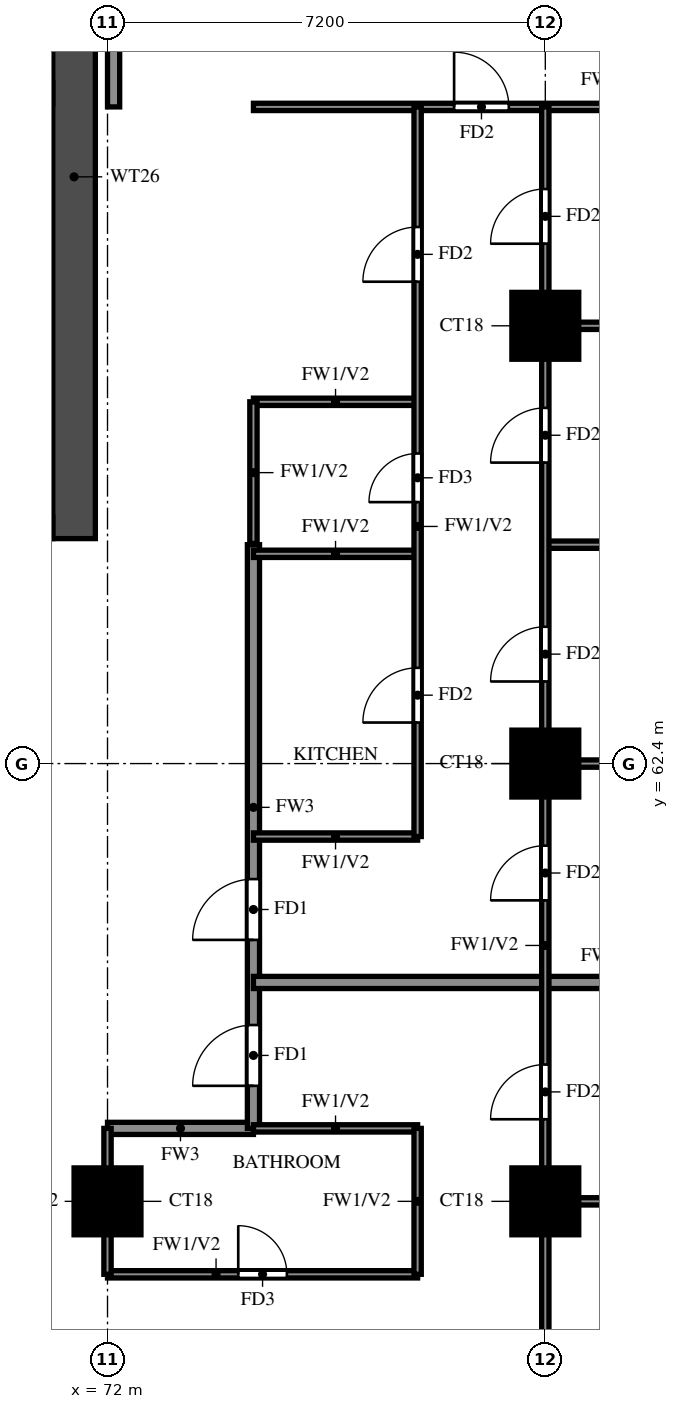
"""IFC4 building model, lengths in metres.
Left out: names, types, materials, properties, quantities, classifications, styles, units other than length and angle.
Written with IfcOpenShell. Run it as: python <this file> out.ifc"""

import sys

from ifc_helpers import new_model, si_unit, direction, frame, frame_2d, origin, origin_2d, place, context, subcontext, project, spatial, rectangle, extrude, source, transform, mapped, element, fill, save


model = new_model("IFC4")
c1 = context("Model", 3, precision=1e-05, world=origin(), true_north=direction((0.0, 1.0)))
c2 = subcontext(c1, "Body", "Model", "MODEL_VIEW")
j1 = project(units=[si_unit("LENGTHUNIT", "METRE"), si_unit("PLANEANGLEUNIT", "RADIAN")], contexts=[c1])
p1 = place(None, origin())
s1 = spatial("IfcSite", under=j1, at=p1, CompositionType="ELEMENT")
p2 = place(p1, origin())
s2 = spatial("IfcBuilding", under=s1, at=p2, CompositionType="ELEMENT")
p3 = place(p2, frame((0.0, 0.0, 123.5)))
s3 = spatial("IfcBuildingStorey", under=s2, at=p3, CompositionType="ELEMENT", Elevation=123.5)
m1 = source(origin(), c2, "Body", "SweptSolid", [
    extrude(rectangle(XDim=1.1, YDim=1.1, at=origin_2d()), origin(), (0.0, 0.0, 1.0), 3.2),
])
for number, where, z_axis, x_axis in (
    (1, (72.0, 55.2, 0.0), (0.0, 0.0, 1.0), (1.0, 0.0, 0.0)),
    (2, (79.2, 55.2, 0.0), (0.0, 0.0, 1.0), (1.0, 0.0, 0.0)),
    (3, (79.2, 62.4, 0.0), (0.0, 0.0, 1.0), (1.0, 0.0, 0.0)),
    (4, (79.2, 69.6, 0.0), (0.0, 0.0, 1.0), (1.0, 0.0, 0.0)),
):
    element("IfcColumn", number, at=place(p3, frame(where, z_axis=z_axis, x_axis=x_axis)), inside=s3, PredefinedType="COLUMN", context=c2, shape_type="MappedRepresentation", body=[
        mapped(m1, transform((0.0, 0.0, 0.0))),
    ])
p4 = place(p3, frame((71.45, 66.1, 0.0), z_axis=(0.0, 0.0, 1.0), x_axis=(0.0, 1.0, 0.0)))
e5 = element("IfcWall", 5, at=p4, inside=s3, PredefinedType="SHEAR", context=c2, shape_type="SweptSolid", body=[
    extrude(rectangle(XDim=11.9, YDim=0.7, at=frame_2d((5.95, 0.0))), origin(), (0.0, 0.0, 1.0), 3.2),
])
p5 = place(p3, frame((29.7, 66.275, 0.0), z_axis=(0.0, 0.0, 1.0), x_axis=(1.0, 0.0, 0.0)))
e6 = element("IfcWall", 6, at=p5, inside=s3, PredefinedType="SHEAR", context=c2, shape_type="SweptSolid", body=[
    extrude(rectangle(XDim=41.4, YDim=0.35, at=frame_2d((20.7, 0.0))), origin(), (0.0, 0.0, 1.0), 3.2),
])
p6 = place(p5, frame((0.925, 0.0, 0.0)))
e7 = element("IfcOpeningElement", 7, at=p6, cuts=e6, PredefinedType="OPENING", context=c2, shape_type="SweptSolid", body=[
    extrude(rectangle(XDim=1.1, YDim=2.1, at=frame_2d((0.55, 1.05))), frame((0.0, 0.185, 0.0), z_axis=(0.0, -1.0, 0.0), x_axis=(1.0, 0.0, 0.0)), (0.0, 0.0, 1.0), 0.37),
])
p7 = place(p5, frame((3.712, 0.0, 0.0)))
e8 = element("IfcOpeningElement", 8, at=p7, cuts=e6, PredefinedType="OPENING", context=c2, shape_type="SweptSolid", body=[
    extrude(rectangle(XDim=1.8, YDim=2.1, at=frame_2d((0.9, 1.05))), frame((0.0, 0.185, 0.0), z_axis=(0.0, -1.0, 0.0), x_axis=(1.0, 0.0, 0.0)), (0.0, 0.0, 1.0), 0.37),
])
p8 = place(p3, frame((72.0, 56.4, 0.0), z_axis=(0.0, 0.0, 1.0), x_axis=(1.0, 0.0, 0.0)))
e9 = element("IfcWall", 9, at=p8, inside=s3, PredefinedType="SOLIDWALL", context=c2, shape_type="SweptSolid", body=[
    extrude(rectangle(XDim=2.4, YDim=0.2, at=frame_2d((1.2, 0.0))), origin(), (0.0, 0.0, 1.0), 3.2),
])
p9 = place(p3, frame((72.1, 73.2, 0.0), z_axis=(0.0, 0.0, 1.0), x_axis=(0.0, 1.0, 0.0)))
e10 = element("IfcWall", 10, at=p9, inside=s3, PredefinedType="SOLIDWALL", context=c2, shape_type="SweptSolid", body=[
    extrude(rectangle(XDim=4.8, YDim=0.2, at=frame_2d((2.4, 0.0))), origin(), (0.0, 0.0, 1.0), 3.2),
])
p10 = place(p3, frame((74.4, 56.4, 0.0), z_axis=(0.0, 0.0, 1.0), x_axis=(0.0, 1.0, 0.0)))
e11 = element("IfcWall", 11, at=p10, inside=s3, PredefinedType="SOLIDWALL", context=c2, shape_type="SweptSolid", body=[
    extrude(rectangle(XDim=9.6, YDim=0.2, at=frame_2d((4.8, 0.0))), origin(), (0.0, 0.0, 1.0), 3.2),
])
p11 = place(p10, frame((0.7, 0.0, 0.0)))
e12 = element("IfcOpeningElement", 12, at=p11, cuts=e11, PredefinedType="OPENING", context=c2, shape_type="SweptSolid", body=[
    extrude(rectangle(XDim=1.0, YDim=2.1, at=frame_2d((0.5, 1.05))), frame((0.0, 0.11, 0.0), z_axis=(0.0, -1.0, 0.0), x_axis=(1.0, 0.0, 0.0)), (0.0, 0.0, 1.0), 0.22),
])
p12 = place(p10, frame((3.1, 0.0, 0.0)))
e13 = element("IfcOpeningElement", 13, at=p12, cuts=e11, PredefinedType="OPENING", context=c2, shape_type="SweptSolid", body=[
    extrude(rectangle(XDim=1.0, YDim=2.1, at=frame_2d((0.5, 1.05))), frame((0.0, 0.11, 0.0), z_axis=(0.0, -1.0, 0.0), x_axis=(1.0, 0.0, 0.0)), (0.0, 0.0, 1.0), 0.22),
])
p13 = place(p3, frame((74.4, 58.8, 0.0), z_axis=(0.0, 0.0, 1.0), x_axis=(1.0, 0.0, 0.0)))
e14 = element("IfcWall", 14, at=p13, inside=s3, PredefinedType="SOLIDWALL", context=c2, shape_type="SweptSolid", body=[
    extrude(rectangle(XDim=11.875, YDim=0.2, at=frame_2d((5.938, 0.0))), origin(), (0.0, 0.0, 1.0), 2.3),
])
p14 = place(p3, frame((72.0, 54.0, 0.0), z_axis=(0.0, 0.0, 1.0), x_axis=(1.0, 0.0, 0.0)))
e15 = element("IfcWall", 15, at=p14, inside=s3, PredefinedType="PARTITIONING", context=c2, shape_type="SweptSolid", body=[
    extrude(rectangle(XDim=5.1, YDim=0.12, at=frame_2d((2.55, 0.0))), origin(), (0.0, 0.0, 1.0), 3.2),
])
p15 = place(p14, frame((2.15, 0.0, 0.0)))
e16 = element("IfcOpeningElement", 16, at=p15, cuts=e15, PredefinedType="OPENING", context=c2, shape_type="SweptSolid", body=[
    extrude(rectangle(XDim=0.8, YDim=2.1, at=frame_2d((0.4, 1.05))), frame((0.0, 0.07, 0.0), z_axis=(0.0, -1.0, 0.0), x_axis=(1.0, 0.0, 0.0)), (0.0, 0.0, 1.0), 0.14),
])
p16 = place(p3, frame((79.2, 55.2, 0.0), z_axis=(0.0, 0.0, 1.0), x_axis=(1.0, 0.0, 0.0)))
e17 = element("IfcWall", 17, at=p16, inside=s3, PredefinedType="PARTITIONING", context=c2, shape_type="SweptSolid", body=[
    extrude(rectangle(XDim=7.075, YDim=0.12, at=frame_2d((3.538, 0.0))), origin(), (0.0, 0.0, 1.0), 3.2),
])
for number, where, z_axis, x_axis in (
    (18, (74.4, 56.4, 0.0), (0.0, 0.0, 1.0), (1.0, 0.0, 0.0)),
    (19, (74.4, 61.2, 0.0), (0.0, 0.0, 1.0), (1.0, 0.0, 0.0)),
):
    element("IfcWall", number, at=place(p3, frame(where, z_axis=z_axis, x_axis=x_axis)), inside=s3, PredefinedType="PARTITIONING", context=c2, shape_type="SweptSolid", body=[
        extrude(rectangle(XDim=2.7, YDim=0.12, at=frame_2d((1.35, 0.0))), origin(), (0.0, 0.0, 1.0), 3.2),
    ])
p17 = place(p3, frame((79.2, 62.4, 0.0), z_axis=(0.0, 0.0, 1.0), x_axis=(1.0, 0.0, 0.0)))
e20 = element("IfcWall", 20, at=p17, inside=s3, PredefinedType="PARTITIONING", context=c2, shape_type="SweptSolid", body=[
    extrude(rectangle(XDim=7.075, YDim=0.12, at=frame_2d((3.538, 0.0))), origin(), (0.0, 0.0, 1.0), 3.2),
])
p18 = place(p3, frame((74.4, 65.85, 0.0), z_axis=(0.0, 0.0, 1.0), x_axis=(1.0, 0.0, 0.0)))
e21 = element("IfcWall", 21, at=p18, inside=s3, PredefinedType="PARTITIONING", context=c2, shape_type="SweptSolid", body=[
    extrude(rectangle(XDim=2.7, YDim=0.12, at=frame_2d((1.35, 0.0))), origin(), (0.0, 0.0, 1.0), 3.2),
])
p19 = place(p3, frame((79.2, 66.0, 0.0), z_axis=(0.0, 0.0, 1.0), x_axis=(1.0, 0.0, 0.0)))
e22 = element("IfcWall", 22, at=p19, inside=s3, PredefinedType="PARTITIONING", context=c2, shape_type="SweptSolid", body=[
    extrude(rectangle(XDim=7.075, YDim=0.12, at=frame_2d((3.538, 0.0))), origin(), (0.0, 0.0, 1.0), 2.3),
])
p20 = place(p3, frame((74.4, 68.35, 0.0), z_axis=(0.0, 0.0, 1.0), x_axis=(1.0, 0.0, 0.0)))
e23 = element("IfcWall", 23, at=p20, inside=s3, PredefinedType="PARTITIONING", context=c2, shape_type="SweptSolid", body=[
    extrude(rectangle(XDim=2.7, YDim=0.12, at=frame_2d((1.35, 0.0))), origin(), (0.0, 0.0, 1.0), 3.2),
])
p21 = place(p3, frame((79.2, 69.6, 0.0), z_axis=(0.0, 0.0, 1.0), x_axis=(1.0, 0.0, 0.0)))
e24 = element("IfcWall", 24, at=p21, inside=s3, PredefinedType="PARTITIONING", context=c2, shape_type="SweptSolid", body=[
    extrude(rectangle(XDim=7.075, YDim=0.12, at=frame_2d((3.538, 0.0))), origin(), (0.0, 0.0, 1.0), 3.2),
])
p22 = place(p3, frame((74.4, 73.2, 0.0), z_axis=(0.0, 0.0, 1.0), x_axis=(1.0, 0.0, 0.0)))
e25 = element("IfcWall", 25, at=p22, inside=s3, PredefinedType="PARTITIONING", context=c2, shape_type="SweptSolid", body=[
    extrude(rectangle(XDim=11.875, YDim=0.12, at=frame_2d((5.938, 0.0))), origin(), (0.0, 0.0, 1.0), 2.3),
])
p23 = place(p22, frame((3.3, 0.0, 0.0)))
e26 = element("IfcOpeningElement", 26, at=p23, cuts=e25, PredefinedType="OPENING", context=c2, shape_type="SweptSolid", body=[
    extrude(rectangle(XDim=0.9, YDim=2.1, at=frame_2d((0.45, 1.05))), frame((0.0, 0.07, 0.0), z_axis=(0.0, -1.0, 0.0), x_axis=(1.0, 0.0, 0.0)), (0.0, 0.0, 1.0), 0.14),
])
p24 = place(p3, frame((72.0, 54.0, 0.0), z_axis=(0.0, 0.0, 1.0), x_axis=(0.0, 1.0, 0.0)))
e27 = element("IfcWall", 27, at=p24, inside=s3, PredefinedType="PARTITIONING", context=c2, shape_type="SweptSolid", body=[
    extrude(rectangle(XDim=2.4, YDim=0.12, at=frame_2d((1.2, 0.0))), origin(), (0.0, 0.0, 1.0), 3.2),
])
p25 = place(p3, frame((74.4, 66.02, 0.0), z_axis=(0.0, 0.0, 1.0), x_axis=(0.0, 1.0, 0.0)))
e28 = element("IfcWall", 28, at=p25, inside=s3, PredefinedType="PARTITIONING", context=c2, shape_type="SweptSolid", body=[
    extrude(rectangle(XDim=2.33, YDim=0.12, at=frame_2d((1.165, 0.0))), origin(), (0.0, 0.0, 1.0), 3.2),
])
p26 = place(p3, frame((77.1, 54.0, 0.0), z_axis=(0.0, 0.0, 1.0), x_axis=(0.0, 1.0, 0.0)))
e29 = element("IfcWall", 29, at=p26, inside=s3, PredefinedType="PARTITIONING", context=c2, shape_type="SweptSolid", body=[
    extrude(rectangle(XDim=2.4, YDim=0.12, at=frame_2d((1.2, 0.0))), origin(), (0.0, 0.0, 1.0), 3.2),
])
p27 = place(p3, frame((77.1, 61.2, 0.0), z_axis=(0.0, 0.0, 1.0), x_axis=(0.0, 1.0, 0.0)))
e30 = element("IfcWall", 30, at=p27, inside=s3, PredefinedType="PARTITIONING", context=c2, shape_type="SweptSolid", body=[
    extrude(rectangle(XDim=12.0, YDim=0.12, at=frame_2d((6.0, 0.0))), origin(), (0.0, 0.0, 1.0), 3.2),
])
p28 = place(p27, frame((1.875, 0.0, 0.0)))
e31 = element("IfcOpeningElement", 31, at=p28, cuts=e30, PredefinedType="OPENING", context=c2, shape_type="SweptSolid", body=[
    extrude(rectangle(XDim=0.9, YDim=2.1, at=frame_2d((0.45, 1.05))), frame((0.0, 0.07, 0.0), z_axis=(0.0, -1.0, 0.0), x_axis=(1.0, 0.0, 0.0)), (0.0, 0.0, 1.0), 0.14),
])
p29 = place(p27, frame((5.5, 0.0, 0.0)))
e32 = element("IfcOpeningElement", 32, at=p29, cuts=e30, PredefinedType="OPENING", context=c2, shape_type="SweptSolid", body=[
    extrude(rectangle(XDim=0.8, YDim=2.1, at=frame_2d((0.4, 1.05))), frame((0.0, 0.07, 0.0), z_axis=(0.0, -1.0, 0.0), x_axis=(1.0, 0.0, 0.0)), (0.0, 0.0, 1.0), 0.14),
])
p30 = place(p27, frame((9.125, 0.0, 0.0)))
e33 = element("IfcOpeningElement", 33, at=p30, cuts=e30, PredefinedType="OPENING", context=c2, shape_type="SweptSolid", body=[
    extrude(rectangle(XDim=0.9, YDim=2.1, at=frame_2d((0.45, 1.05))), frame((0.0, 0.07, 0.0), z_axis=(0.0, -1.0, 0.0), x_axis=(1.0, 0.0, 0.0)), (0.0, 0.0, 1.0), 0.14),
])
p31 = place(p3, frame((79.2, 48.125, 0.0), z_axis=(0.0, 0.0, 1.0), x_axis=(0.0, 1.0, 0.0)))
e34 = element("IfcWall", 34, at=p31, inside=s3, PredefinedType="PARTITIONING", context=c2, shape_type="SweptSolid", body=[
    extrude(rectangle(XDim=25.075, YDim=0.12, at=frame_2d((12.538, 0.0))), origin(), (0.0, 0.0, 1.0), 3.2),
])
p32 = place(p31, frame((2.788, 0.0, 0.0)))
e35 = element("IfcOpeningElement", 35, at=p32, cuts=e34, PredefinedType="OPENING", context=c2, shape_type="SweptSolid", body=[
    extrude(rectangle(XDim=1.5, YDim=2.1, at=frame_2d((0.75, 1.05))), frame((0.0, 0.07, 0.0), z_axis=(0.0, -1.0, 0.0), x_axis=(1.0, 0.0, 0.0)), (0.0, 0.0, 1.0), 0.14),
])
p33 = place(p31, frame((8.425, 0.0, 0.0)))
e36 = element("IfcOpeningElement", 36, at=p33, cuts=e34, PredefinedType="OPENING", context=c2, shape_type="SweptSolid", body=[
    extrude(rectangle(XDim=0.9, YDim=2.1, at=frame_2d((0.45, 1.05))), frame((0.0, 0.07, 0.0), z_axis=(0.0, -1.0, 0.0), x_axis=(1.0, 0.0, 0.0)), (0.0, 0.0, 1.0), 0.14),
])
p34 = place(p31, frame((12.025, 0.0, 0.0)))
e37 = element("IfcOpeningElement", 37, at=p34, cuts=e34, PredefinedType="OPENING", context=c2, shape_type="SweptSolid", body=[
    extrude(rectangle(XDim=0.9, YDim=2.1, at=frame_2d((0.45, 1.05))), frame((0.0, 0.07, 0.0), z_axis=(0.0, -1.0, 0.0), x_axis=(1.0, 0.0, 0.0)), (0.0, 0.0, 1.0), 0.14),
])
p35 = place(p31, frame((15.625, 0.0, 0.0)))
e38 = element("IfcOpeningElement", 38, at=p35, cuts=e34, PredefinedType="OPENING", context=c2, shape_type="SweptSolid", body=[
    extrude(rectangle(XDim=0.9, YDim=2.1, at=frame_2d((0.45, 1.05))), frame((0.0, 0.07, 0.0), z_axis=(0.0, -1.0, 0.0), x_axis=(1.0, 0.0, 0.0)), (0.0, 0.0, 1.0), 0.14),
])
p36 = place(p31, frame((19.225, 0.0, 0.0)))
e39 = element("IfcOpeningElement", 39, at=p36, cuts=e34, PredefinedType="OPENING", context=c2, shape_type="SweptSolid", body=[
    extrude(rectangle(XDim=0.9, YDim=2.1, at=frame_2d((0.45, 1.05))), frame((0.0, 0.07, 0.0), z_axis=(0.0, -1.0, 0.0), x_axis=(1.0, 0.0, 0.0)), (0.0, 0.0, 1.0), 0.14),
])
p37 = place(p31, frame((22.825, 0.0, 0.0)))
e40 = element("IfcOpeningElement", 40, at=p37, cuts=e34, PredefinedType="OPENING", context=c2, shape_type="SweptSolid", body=[
    extrude(rectangle(XDim=0.9, YDim=2.1, at=frame_2d((0.45, 1.05))), frame((0.0, 0.07, 0.0), z_axis=(0.0, -1.0, 0.0), x_axis=(1.0, 0.0, 0.0)), (0.0, 0.0, 1.0), 0.14),
])
p38 = place(p11, origin())
e41 = element("IfcDoor", 41, at=p38, inside=s3, OperationType="SINGLE_SWING_LEFT", PredefinedType="DOOR", context=c2, shape_type="SweptSolid", body=[
    extrude(rectangle(XDim=1.0, YDim=2.1, at=frame_2d((0.5, 1.05))), frame((0.0, 0.025, 0.0), z_axis=(0.0, -1.0, 0.0), x_axis=(1.0, 0.0, 0.0)), (0.0, 0.0, 1.0), 0.05),
])
fill(e12, e41)
p39 = place(p33, origin())
e42 = element("IfcDoor", 42, at=p39, inside=s3, OperationType="SINGLE_SWING_LEFT", PredefinedType="DOOR", context=c2, shape_type="SweptSolid", body=[
    extrude(rectangle(XDim=0.9, YDim=2.1, at=frame_2d((0.45, 1.05))), frame((0.0, 0.025, 0.0), z_axis=(0.0, -1.0, 0.0), x_axis=(1.0, 0.0, 0.0)), (0.0, 0.0, 1.0), 0.05),
])
fill(e36, e42)
p40 = place(p15, origin())
e43 = element("IfcDoor", 43, at=p40, inside=s3, OperationType="SINGLE_SWING_RIGHT", PredefinedType="DOOR", context=c2, shape_type="SweptSolid", body=[
    extrude(rectangle(XDim=0.8, YDim=2.1, at=frame_2d((0.4, 1.05))), frame((0.0, 0.025, 0.0), z_axis=(0.0, -1.0, 0.0), x_axis=(1.0, 0.0, 0.0)), (0.0, 0.0, 1.0), 0.05),
])
fill(e16, e43)
p41 = place(p12, origin())
e44 = element("IfcDoor", 44, at=p41, inside=s3, OperationType="SINGLE_SWING_RIGHT", PredefinedType="DOOR", context=c2, shape_type="SweptSolid", body=[
    extrude(rectangle(XDim=1.0, YDim=2.1, at=frame_2d((0.5, 1.05))), frame((0.0, 0.025, 0.0), z_axis=(0.0, -1.0, 0.0), x_axis=(1.0, 0.0, 0.0)), (0.0, 0.0, 1.0), 0.05),
])
fill(e13, e44)
p42 = place(p34, origin())
e45 = element("IfcDoor", 45, at=p42, inside=s3, OperationType="SINGLE_SWING_LEFT", PredefinedType="DOOR", context=c2, shape_type="SweptSolid", body=[
    extrude(rectangle(XDim=0.9, YDim=2.1, at=frame_2d((0.45, 1.05))), frame((0.0, 0.025, 0.0), z_axis=(0.0, -1.0, 0.0), x_axis=(1.0, 0.0, 0.0)), (0.0, 0.0, 1.0), 0.05),
])
fill(e37, e45)
p43 = place(p35, origin())
e46 = element("IfcDoor", 46, at=p43, inside=s3, OperationType="SINGLE_SWING_LEFT", PredefinedType="DOOR", context=c2, shape_type="SweptSolid", body=[
    extrude(rectangle(XDim=0.9, YDim=2.1, at=frame_2d((0.45, 1.05))), frame((0.0, 0.025, 0.0), z_axis=(0.0, -1.0, 0.0), x_axis=(1.0, 0.0, 0.0)), (0.0, 0.0, 1.0), 0.05),
])
fill(e38, e46)
p44 = place(p36, origin())
e47 = element("IfcDoor", 47, at=p44, inside=s3, OperationType="SINGLE_SWING_RIGHT", PredefinedType="DOOR", context=c2, shape_type="SweptSolid", body=[
    extrude(rectangle(XDim=0.9, YDim=2.1, at=frame_2d((0.45, 1.05))), frame((0.0, 0.025, 0.0), z_axis=(0.0, -1.0, 0.0), x_axis=(1.0, 0.0, 0.0)), (0.0, 0.0, 1.0), 0.05),
])
fill(e39, e47)
p45 = place(p37, origin())
e48 = element("IfcDoor", 48, at=p45, inside=s3, OperationType="SINGLE_SWING_LEFT", PredefinedType="DOOR", context=c2, shape_type="SweptSolid", body=[
    extrude(rectangle(XDim=0.9, YDim=2.1, at=frame_2d((0.45, 1.05))), frame((0.0, 0.025, 0.0), z_axis=(0.0, -1.0, 0.0), x_axis=(1.0, 0.0, 0.0)), (0.0, 0.0, 1.0), 0.05),
])
fill(e40, e48)
p46 = place(p23, origin())
e49 = element("IfcDoor", 49, at=p46, inside=s3, OperationType="SINGLE_SWING_LEFT", PredefinedType="DOOR", context=c2, shape_type="SweptSolid", body=[
    extrude(rectangle(XDim=0.9, YDim=2.1, at=frame_2d((0.45, 1.05))), frame((0.0, 0.025, 0.0), z_axis=(0.0, -1.0, 0.0), x_axis=(1.0, 0.0, 0.0)), (0.0, 0.0, 1.0), 0.05),
])
fill(e26, e49)
p47 = place(p28, origin())
e50 = element("IfcDoor", 50, at=p47, inside=s3, OperationType="SINGLE_SWING_RIGHT", PredefinedType="DOOR", context=c2, shape_type="SweptSolid", body=[
    extrude(rectangle(XDim=0.9, YDim=2.1, at=frame_2d((0.45, 1.05))), frame((0.0, 0.025, 0.0), z_axis=(0.0, -1.0, 0.0), x_axis=(1.0, 0.0, 0.0)), (0.0, 0.0, 1.0), 0.05),
])
fill(e31, e50)
p48 = place(p29, origin())
e51 = element("IfcDoor", 51, at=p48, inside=s3, OperationType="SINGLE_SWING_LEFT", PredefinedType="DOOR", context=c2, shape_type="SweptSolid", body=[
    extrude(rectangle(XDim=0.8, YDim=2.1, at=frame_2d((0.4, 1.05))), frame((0.0, 0.025, 0.0), z_axis=(0.0, -1.0, 0.0), x_axis=(1.0, 0.0, 0.0)), (0.0, 0.0, 1.0), 0.05),
])
fill(e32, e51)
p49 = place(p30, origin())
e52 = element("IfcDoor", 52, at=p49, inside=s3, OperationType="SINGLE_SWING_LEFT", PredefinedType="DOOR", context=c2, shape_type="SweptSolid", body=[
    extrude(rectangle(XDim=0.9, YDim=2.1, at=frame_2d((0.45, 1.05))), frame((0.0, 0.025, 0.0), z_axis=(0.0, -1.0, 0.0), x_axis=(1.0, 0.0, 0.0)), (0.0, 0.0, 1.0), 0.05),
])
fill(e33, e52)
save(model, sys.argv[1])
